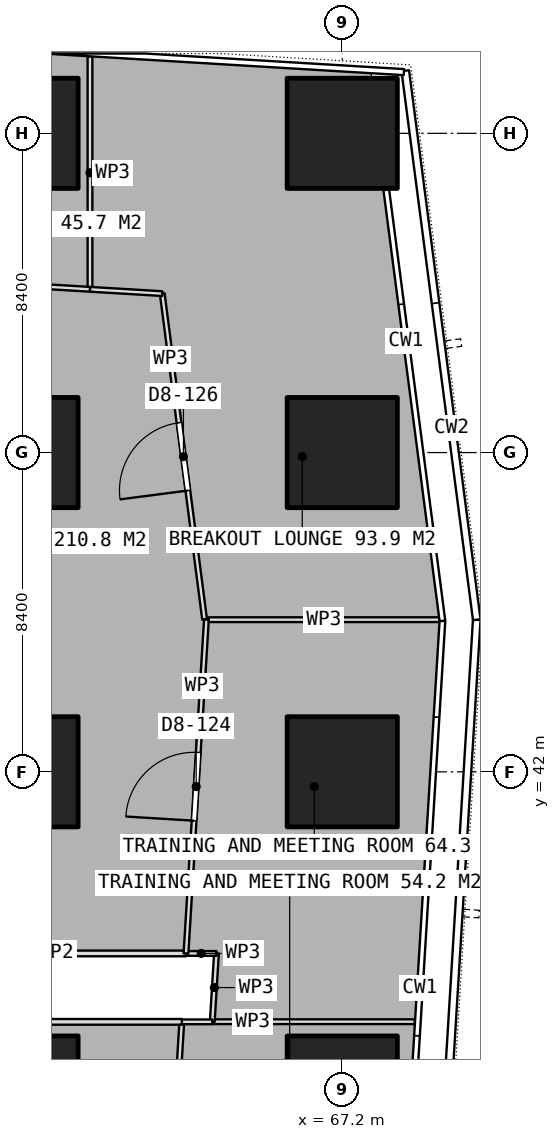
"""IFC4 building model, lengths in metres.
Left out: names, types, materials, properties, quantities, classifications, styles, units other than length and angle.
Written with IfcOpenShell. Run it as: python <this file> out.ifc"""

import sys

from ifc_helpers import new_model, si_unit, direction, frame, frame_2d, origin, origin_2d, place, context, subcontext, project, spatial, rectangle, extrude, element, fill, save


model = new_model("IFC4")
c1 = context("Model", 3, precision=1e-05, world=origin(), true_north=direction((0.0, 1.0)))
c2 = subcontext(c1, "Body", "Model", "MODEL_VIEW")
j1 = project(units=[si_unit("LENGTHUNIT", "METRE"), si_unit("PLANEANGLEUNIT", "RADIAN")], contexts=[c1])
p1 = place(None, origin())
s1 = spatial("IfcSite", under=j1, at=p1, CompositionType="ELEMENT")
p2 = place(p1, origin())
s2 = spatial("IfcBuilding", under=s1, at=p2, CompositionType="ELEMENT")
p3 = place(p2, frame((0.0, 0.0, 95.3)))
s3 = spatial("IfcBuildingStorey", under=s2, at=p3, CompositionType="ELEMENT", Elevation=95.3)
for number, where, z_axis, x_axis in (
    (1, (58.8, 33.6, 0.0), (0.0, 0.0, 1.0), (1.0, 0.0, 0.0)),
    (2, (58.8, 42.0, 0.0), (0.0, 0.0, 1.0), (1.0, 0.0, 0.0)),
    (3, (58.8, 50.4, 0.0), (0.0, 0.0, 1.0), (1.0, 0.0, 0.0)),
    (4, (58.8, 58.8, 0.0), (0.0, 0.0, 1.0), (1.0, 0.0, 0.0)),
    (5, (67.2, 33.6, 0.0), (0.0, 0.0, 1.0), (1.0, 0.0, 0.0)),
    (6, (67.2, 42.0, 0.0), (0.0, 0.0, 1.0), (1.0, 0.0, 0.0)),
    (7, (67.2, 50.4, 0.0), (0.0, 0.0, 1.0), (1.0, 0.0, 0.0)),
    (8, (67.2, 58.8, 0.0), (0.0, 0.0, 1.0), (1.0, 0.0, 0.0)),
):
    element("IfcColumn", number, at=place(p3, frame(where, z_axis=z_axis, x_axis=x_axis)), inside=s3, PredefinedType="COLUMN", context=c2, shape_type="SweptSolid", body=[
        extrude(rectangle(XDim=2.9, YDim=2.9, at=origin_2d()), origin(), (0.0, 0.0, 1.0), 3.75),
    ])
p4 = place(p3, frame((69.11, 35.425, 0.0), z_axis=(0.0, 0.0, 1.0), x_axis=(-1.0, 0.0, 0.0)))
e9 = element("IfcWall", 9, at=p4, inside=s3, PredefinedType="PARTITIONING", context=c2, shape_type="SweptSolid", body=[
    extrude(rectangle(XDim=5.33, YDim=0.125, at=frame_2d((2.665, 0.0))), origin(), (0.0, 0.0, 1.0), 3.5),
])
p5 = place(p3, frame((63.78, 35.425, 0.0), z_axis=(0.0, 0.0, 1.0), x_axis=(0.06106040412, 0.998134072682, 0.0)))
e10 = element("IfcWall", 10, at=p5, inside=s3, PredefinedType="PARTITIONING", context=c2, shape_type="SweptSolid", body=[
    extrude(rectangle(XDim=1.799, YDim=0.125, at=frame_2d((0.9, 0.0))), origin(), (0.0, 0.0, 1.0), 3.5),
])
p6 = place(p3, frame((63.89, 37.221, 0.0), z_axis=(0.0, 0.0, 1.0), x_axis=(-1.0, 0.0, 0.0)))
e11 = element("IfcWall", 11, at=p6, inside=s3, PredefinedType="PARTITIONING", context=c2, shape_type="SweptSolid", body=[
    extrude(rectangle(XDim=0.802, YDim=0.125, at=frame_2d((0.401, 0.0))), origin(), (0.0, 0.0, 1.0), 3.5),
])
p7 = place(p3, frame((63.088, 37.221, 0.0), z_axis=(0.0, 0.0, 1.0), x_axis=(0.061107808396, 0.998131171617, 0.0)))
e12 = element("IfcWall", 12, at=p7, inside=s3, PredefinedType="PARTITIONING", context=c2, shape_type="SweptSolid", body=[
    extrude(rectangle(XDim=8.805, YDim=0.125, at=frame_2d((4.403, 0.0))), origin(), (0.0, 0.0, 1.0), 3.5),
])
p8 = place(p7, frame((3.499, 0.0, 0.0)))
e13 = element("IfcOpeningElement", 13, at=p8, cuts=e12, PredefinedType="OPENING", context=c2, shape_type="SweptSolid", body=[
    extrude(rectangle(XDim=1.8, YDim=2.1, at=frame_2d((0.9, 1.05))), frame((0.0, 0.073, 0.0), z_axis=(0.0, -1.0, 0.0), x_axis=(1.0, 0.0, 0.0)), (0.0, 0.0, 1.0), 0.145),
])
p9 = place(p3, frame((63.688, 46.003, 0.0), z_axis=(0.0, 0.0, 1.0), x_axis=(1.0, 0.0, 0.0)))
e14 = element("IfcWall", 14, at=p9, inside=s3, PredefinedType="PARTITIONING", context=c2, shape_type="SweptSolid", body=[
    extrude(rectangle(XDim=6.063, YDim=0.125, at=frame_2d((3.031, 0.0))), origin(), (0.0, 0.0, 1.0), 3.5),
])
p10 = place(p3, frame((60.562, 54.696, 0.0), z_axis=(0.0, 0.0, 1.0), x_axis=(0.0, 1.0, 0.0)))
e15 = element("IfcWall", 15, at=p10, inside=s3, PredefinedType="PARTITIONING", context=c2, shape_type="SweptSolid", body=[
    extrude(rectangle(XDim=6.131, YDim=0.125, at=frame_2d((3.065, 0.0))), origin(), (0.0, 0.0, 1.0), 3.5),
])
p11 = place(p3, frame((63.578, 46.013, 0.0), z_axis=(0.0, 0.0, 1.0), x_axis=(-0.129029973766, 0.991640693936, 0.0)))
e16 = element("IfcWall", 16, at=p11, inside=s3, PredefinedType="PARTITIONING", context=c2, shape_type="SweptSolid", body=[
    extrude(rectangle(XDim=8.641, YDim=0.125, at=frame_2d((4.321, 0.0))), origin(), (0.0, 0.0, 1.0), 3.5),
])
p12 = place(p11, frame((3.416, 0.0, 0.0)))
e17 = element("IfcOpeningElement", 17, at=p12, cuts=e16, PredefinedType="OPENING", context=c2, shape_type="SweptSolid", body=[
    extrude(rectangle(XDim=1.8, YDim=2.1, at=frame_2d((0.9, 1.05))), frame((0.0, 0.073, 0.0), z_axis=(0.0, -1.0, 0.0), x_axis=(1.0, 0.0, 0.0)), (0.0, 0.0, 1.0), 0.145),
])
p13 = place(p3, frame((62.463, 54.582, 0.0), z_axis=(0.0, 0.0, 1.0), x_axis=(-0.998206071612, 0.059871851457, 0.0)))
e18 = element("IfcWall", 18, at=p13, inside=s3, PredefinedType="PARTITIONING", context=c2, shape_type="SweptSolid", body=[
    extrude(rectangle(XDim=1.904, YDim=0.125, at=frame_2d((0.952, 0.0))), origin(), (0.0, 0.0, 1.0), 3.5),
])
p14 = place(p3, frame((60.561, 54.696, 0.0), z_axis=(0.0, 0.0, 1.0), x_axis=(-0.99820441017, 0.059899545218, 0.0)))
e19 = element("IfcWall", 19, at=p14, inside=s3, PredefinedType="PARTITIONING", context=c2, shape_type="SweptSolid", body=[
    extrude(rectangle(XDim=7.377, YDim=0.125, at=frame_2d((3.688, 0.0))), origin(), (0.0, 0.0, 1.0), 3.5),
])
p15 = place(p14, frame((2.789, 0.0, 0.0)))
e20 = element("IfcOpeningElement", 20, at=p15, cuts=e19, PredefinedType="OPENING", context=c2, shape_type="SweptSolid", body=[
    extrude(rectangle(XDim=1.8, YDim=2.1, at=frame_2d((0.9, 1.05))), frame((0.0, 0.073, 0.0), z_axis=(0.0, -1.0, 0.0), x_axis=(1.0, 0.0, 0.0)), (0.0, 0.0, 1.0), 0.145),
])
p16 = place(p3, frame((63.088, 37.221, 0.0), z_axis=(0.0, 0.0, 1.0), x_axis=(-1.0, 0.0, 0.0)))
e21 = element("IfcWall", 21, at=p16, inside=s3, PredefinedType="PARTITIONING", context=c2, shape_type="SweptSolid", body=[
    extrude(rectangle(XDim=9.738, YDim=0.15, at=frame_2d((4.869, 0.0))), origin(), (0.0, 0.0, 1.0), 3.5),
])
p17 = place(p3, frame((62.444, 26.703, 0.0), z_axis=(0.0, 0.0, 1.0), x_axis=(0.061130522571, 0.998129780745, 0.0)))
e22 = element("IfcWall", 22, at=p17, inside=s3, PredefinedType="PARTITIONING", context=c2, shape_type="SweptSolid", body=[
    extrude(rectangle(XDim=8.734, YDim=0.125, at=frame_2d((4.367, 0.0))), origin(), (0.0, 0.0, 1.0), 3.5),
])
p18 = place(p17, frame((3.467, 0.0, 0.0)))
e23 = element("IfcOpeningElement", 23, at=p18, cuts=e22, PredefinedType="OPENING", context=c2, shape_type="SweptSolid", body=[
    extrude(rectangle(XDim=1.8, YDim=2.1, at=frame_2d((0.9, 1.05))), frame((0.0, 0.073, 0.0), z_axis=(0.0, -1.0, 0.0), x_axis=(1.0, 0.0, 0.0)), (0.0, 0.0, 1.0), 0.145),
])
p19 = place(p3, frame((62.978, 35.421, 0.0), z_axis=(0.0, 0.0, 1.0), x_axis=(1.0, 0.0, 0.0)))
e24 = element("IfcWall", 24, at=p19, inside=s3, PredefinedType="PARTITIONING", context=c2, shape_type="SweptSolid", body=[
    extrude(rectangle(XDim=0.802, YDim=0.125, at=frame_2d((0.401, 0.0))), origin(), (0.0, 0.0, 1.0), 3.5),
])
p20 = place(p3, frame((53.35, 35.421, 0.0), z_axis=(0.0, 0.0, 1.0), x_axis=(1.0, 0.0, 0.0)))
e25 = element("IfcWall", 25, at=p20, inside=s3, PredefinedType="PARTITIONING", context=c2, shape_type="SweptSolid", body=[
    extrude(rectangle(XDim=9.628, YDim=0.15, at=frame_2d((4.814, 0.0))), origin(), (0.0, 0.0, 1.0), 3.5),
])
p21 = place(p20, frame((2.914, 0.0, 0.0)))
e26 = element("IfcOpeningElement", 26, at=p21, cuts=e25, PredefinedType="OPENING", context=c2, shape_type="SweptSolid", body=[
    extrude(rectangle(XDim=1.0, YDim=2.1, at=frame_2d((0.5, 1.05))), frame((0.0, 0.085, 0.0), z_axis=(0.0, -1.0, 0.0), x_axis=(1.0, 0.0, 0.0)), (0.0, 0.0, 1.0), 0.17),
])
p22 = place(p8, origin())
e27 = element("IfcDoor", 27, at=p22, inside=s3, OperationType="DOUBLE_DOOR_SINGLE_SWING", PredefinedType="DOOR", context=c2, shape_type="SweptSolid", body=[
    extrude(rectangle(XDim=1.8, YDim=2.1, at=frame_2d((0.9, 1.05))), frame((0.0, 0.025, 0.0), z_axis=(0.0, -1.0, 0.0), x_axis=(1.0, 0.0, 0.0)), (0.0, 0.0, 1.0), 0.05),
])
fill(e13, e27)
p23 = place(p12, origin())
e28 = element("IfcDoor", 28, at=p23, inside=s3, OperationType="DOUBLE_DOOR_SINGLE_SWING", PredefinedType="DOOR", context=c2, shape_type="SweptSolid", body=[
    extrude(rectangle(XDim=1.8, YDim=2.1, at=frame_2d((0.9, 1.05))), frame((0.0, 0.025, 0.0), z_axis=(0.0, -1.0, 0.0), x_axis=(1.0, 0.0, 0.0)), (0.0, 0.0, 1.0), 0.05),
])
fill(e17, e28)
save(model, sys.argv[1])
